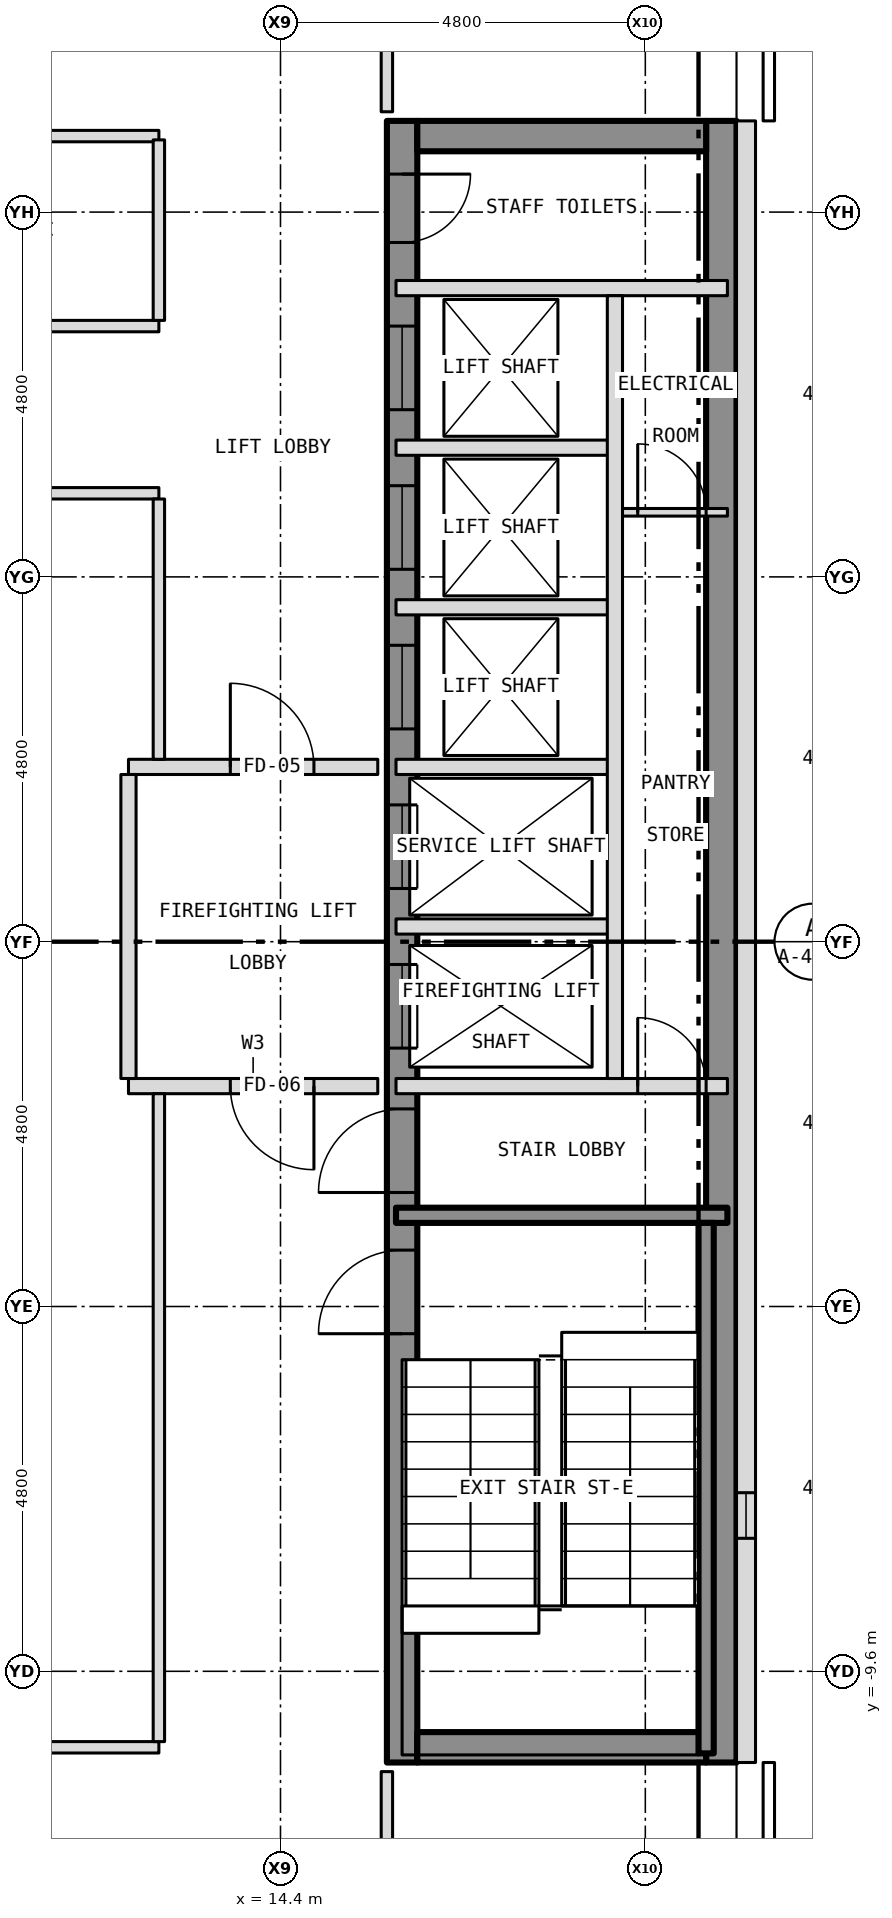
"""IFC4 building model, lengths in metres.
Left out: names, types, materials, properties, quantities, classifications, styles, units other than length and angle.
Written with IfcOpenShell. Run it as: python <this file> out.ifc"""

import sys

from ifc_helpers import new_model, si_unit, direction, frame, frame_2d, origin, place, context, subcontext, project, spatial, rectangle, extrude, element, fill, save


model = new_model("IFC4")
c1 = context("Model", 3, precision=1e-05, world=origin(), true_north=direction((0.0, 1.0)))
c2 = subcontext(c1, "Body", "Model", "MODEL_VIEW")
j1 = project(units=[si_unit("LENGTHUNIT", "METRE"), si_unit("PLANEANGLEUNIT", "RADIAN")], contexts=[c1])
p1 = place(None, origin())
s1 = spatial("IfcSite", under=j1, at=p1, CompositionType="ELEMENT")
p2 = place(p1, origin())
s2 = spatial("IfcBuilding", under=s1, at=p2, CompositionType="ELEMENT")
p3 = place(p2, frame((0.0, 0.0, 215.5)))
s3 = spatial("IfcBuildingStorey", under=s2, at=p3, CompositionType="ELEMENT", Elevation=215.5)
p4 = place(p3, frame((16.0, -10.8, 0.0), z_axis=(0.0, 0.0, 1.0), x_axis=(0.0, 1.0, 0.0)))
e1 = element("IfcWall", 1, at=p4, inside=s3, PredefinedType="SHEAR", context=c2, shape_type="SweptSolid", body=[
    extrude(rectangle(XDim=21.6, YDim=0.4, at=frame_2d((10.8, 0.0))), origin(), (0.0, 0.0, 1.0), 3.25),
])
p5 = place(p4, frame((9.4, 0.0, 0.0)))
e2 = element("IfcOpeningElement", 2, at=p5, cuts=e1, PredefinedType="OPENING", context=c2, shape_type="SweptSolid", body=[
    extrude(rectangle(XDim=1.1, YDim=2.1, at=frame_2d((0.55, 1.05))), frame((0.0, 0.212, 0.0), z_axis=(0.0, -1.0, 0.0), x_axis=(1.0, 0.0, 0.0)), (0.0, 0.0, 1.0), 0.424),
])
p6 = place(p4, frame((11.5, 0.0, 0.0)))
e3 = element("IfcOpeningElement", 3, at=p6, cuts=e1, PredefinedType="OPENING", context=c2, shape_type="SweptSolid", body=[
    extrude(rectangle(XDim=1.1, YDim=2.1, at=frame_2d((0.55, 1.05))), frame((0.0, 0.212, 0.0), z_axis=(0.0, -1.0, 0.0), x_axis=(1.0, 0.0, 0.0)), (0.0, 0.0, 1.0), 0.424),
])
p7 = place(p4, frame((13.6, 0.0, 0.0)))
e4 = element("IfcOpeningElement", 4, at=p7, cuts=e1, PredefinedType="OPENING", context=c2, shape_type="SweptSolid", body=[
    extrude(rectangle(XDim=1.1, YDim=2.1, at=frame_2d((0.55, 1.05))), frame((0.0, 0.212, 0.0), z_axis=(0.0, -1.0, 0.0), x_axis=(1.0, 0.0, 0.0)), (0.0, 0.0, 1.0), 0.424),
])
p8 = place(p4, frame((15.7, 0.0, 0.0)))
e5 = element("IfcOpeningElement", 5, at=p8, cuts=e1, PredefinedType="OPENING", context=c2, shape_type="SweptSolid", body=[
    extrude(rectangle(XDim=1.1, YDim=2.1, at=frame_2d((0.55, 1.05))), frame((0.0, 0.212, 0.0), z_axis=(0.0, -1.0, 0.0), x_axis=(1.0, 0.0, 0.0)), (0.0, 0.0, 1.0), 0.424),
])
p9 = place(p4, frame((17.8, 0.0, 0.0)))
e6 = element("IfcOpeningElement", 6, at=p9, cuts=e1, PredefinedType="OPENING", context=c2, shape_type="SweptSolid", body=[
    extrude(rectangle(XDim=1.1, YDim=2.1, at=frame_2d((0.55, 1.05))), frame((0.0, 0.212, 0.0), z_axis=(0.0, -1.0, 0.0), x_axis=(1.0, 0.0, 0.0)), (0.0, 0.0, 1.0), 0.424),
])
p10 = place(p4, frame((5.642, 0.0, 0.0)))
e7 = element("IfcOpeningElement", 7, at=p10, cuts=e1, PredefinedType="OPENING", context=c2, shape_type="SweptSolid", body=[
    extrude(rectangle(XDim=1.1, YDim=2.1, at=frame_2d((0.55, 1.05))), frame((0.0, 0.212, 0.0), z_axis=(0.0, -1.0, 0.0), x_axis=(1.0, 0.0, 0.0)), (0.0, 0.0, 1.0), 0.424),
])
p11 = place(p4, frame((7.5, 0.0, 0.0)))
e8 = element("IfcOpeningElement", 8, at=p11, cuts=e1, PredefinedType="OPENING", context=c2, shape_type="SweptSolid", body=[
    extrude(rectangle(XDim=1.1, YDim=2.1, at=frame_2d((0.55, 1.05))), frame((0.0, 0.212, 0.0), z_axis=(0.0, -1.0, 0.0), x_axis=(1.0, 0.0, 0.0)), (0.0, 0.0, 1.0), 0.424),
])
p12 = place(p4, frame((20.0, 0.0, 0.0)))
e9 = element("IfcOpeningElement", 9, at=p12, cuts=e1, PredefinedType="OPENING", context=c2, shape_type="SweptSolid", body=[
    extrude(rectangle(XDim=0.9, YDim=2.1, at=frame_2d((0.45, 1.05))), frame((0.0, 0.212, 0.0), z_axis=(0.0, -1.0, 0.0), x_axis=(1.0, 0.0, 0.0)), (0.0, 0.0, 1.0), 0.424),
])
p13 = place(p3, frame((20.2, -10.8, 0.0), z_axis=(0.0, 0.0, 1.0), x_axis=(0.0, 1.0, 0.0)))
e10 = element("IfcWall", 10, at=p13, inside=s3, PredefinedType="SHEAR", context=c2, shape_type="SweptSolid", body=[
    extrude(rectangle(XDim=21.6, YDim=0.4, at=frame_2d((10.8, 0.0))), origin(), (0.0, 0.0, 1.0), 3.25),
])
for number, where, z_axis, x_axis in (
    (11, (16.2, 10.6, 0.0), (0.0, 0.0, 1.0), (1.0, 0.0, 0.0)),
    (12, (16.2, -10.6, 0.0), (0.0, 0.0, 1.0), (1.0, 0.0, 0.0)),
):
    element("IfcWall", number, at=place(p3, frame(where, z_axis=z_axis, x_axis=x_axis)), inside=s3, PredefinedType="SHEAR", context=c2, shape_type="SweptSolid", body=[
        extrude(rectangle(XDim=3.8, YDim=0.4, at=frame_2d((1.9, 0.0))), origin(), (0.0, 0.0, 1.0), 3.25),
    ])
p14 = place(p3, frame((20.525, -10.8, 0.0), z_axis=(0.0, 0.0, 1.0), x_axis=(0.0, 1.0, 0.0)))
e13 = element("IfcWall", 13, at=p14, inside=s3, PredefinedType="SOLIDWALL", context=c2, shape_type="SweptSolid", body=[
    extrude(rectangle(XDim=21.6, YDim=0.25, at=frame_2d((10.8, 0.0))), origin(), (0.0, 0.0, 1.0), 3.5),
])
p15 = place(p14, frame((2.95, 0.0, 1.0)))
e14 = element("IfcOpeningElement", 14, at=p15, cuts=e13, PredefinedType="OPENING", context=c2, shape_type="SweptSolid", body=[
    extrude(rectangle(XDim=0.6, YDim=1.5, at=frame_2d((0.3, 0.75))), frame((0.0, 0.137, 0.0), z_axis=(0.0, -1.0, 0.0), x_axis=(1.0, 0.0, 0.0)), (0.0, 0.0, 1.0), 0.274),
])
p16 = place(p3, frame((3.3, -10.6, 0.0), z_axis=(0.0, 0.0, 1.0), x_axis=(1.0, 0.0, 0.0)))
e15 = element("IfcWall", 15, at=p16, inside=s3, PredefinedType="PARTITIONING", context=c2, shape_type="SweptSolid", body=[
    extrude(rectangle(XDim=9.5, YDim=0.15, at=frame_2d((4.75, 0.0))), origin(), (0.0, 0.0, 1.0), 3.35),
])
p17 = place(p3, frame((15.92, -3.6, 0.0), z_axis=(0.0, 0.0, 1.0), x_axis=(1.0, 0.0, 0.0)))
e16 = element("IfcWall", 16, at=p17, inside=s3, PredefinedType="SHEAR", context=c2, shape_type="SweptSolid", body=[
    extrude(rectangle(XDim=4.36, YDim=0.2, at=frame_2d((2.18, 0.0))), origin(), (0.0, 0.0, 1.0), 3.25),
])
p18 = place(p3, frame((12.4, -1.9, 0.0), z_axis=(0.0, 0.0, 1.0), x_axis=(1.0, 0.0, 0.0)))
e17 = element("IfcWall", 17, at=p18, inside=s3, PredefinedType="PARTITIONING", context=c2, shape_type="SweptSolid", body=[
    extrude(rectangle(XDim=3.28, YDim=0.2, at=frame_2d((1.64, 0.0))), origin(), (0.0, 0.0, 1.0), 3.35),
])
p19 = place(p18, frame((1.34, 0.0, 0.0)))
e18 = element("IfcOpeningElement", 18, at=p19, cuts=e17, PredefinedType="OPENING", context=c2, shape_type="SweptSolid", body=[
    extrude(rectangle(XDim=1.1, YDim=2.1, at=frame_2d((0.55, 1.05))), frame((0.0, 0.112, 0.0), z_axis=(0.0, -1.0, 0.0), x_axis=(1.0, 0.0, 0.0)), (0.0, 0.0, 1.0), 0.224),
])
p20 = place(p3, frame((15.92, -1.9, 0.0), z_axis=(0.0, 0.0, 1.0), x_axis=(1.0, 0.0, 0.0)))
e19 = element("IfcWall", 19, at=p20, inside=s3, PredefinedType="PARTITIONING", context=c2, shape_type="SweptSolid", body=[
    extrude(rectangle(XDim=4.36, YDim=0.2, at=frame_2d((2.18, 0.0))), origin(), (0.0, 0.0, 1.0), 3.25),
])
p21 = place(p20, frame((3.18, 0.0, 0.0)))
e20 = element("IfcOpeningElement", 20, at=p21, cuts=e19, PredefinedType="OPENING", context=c2, shape_type="SweptSolid", body=[
    extrude(rectangle(XDim=0.9, YDim=2.1, at=frame_2d((0.45, 1.05))), frame((0.0, 0.112, 0.0), z_axis=(0.0, -1.0, 0.0), x_axis=(1.0, 0.0, 0.0)), (0.0, 0.0, 1.0), 0.224),
])
p22 = place(p3, frame((15.92, 0.2, 0.0), z_axis=(0.0, 0.0, 1.0), x_axis=(1.0, 0.0, 0.0)))
e21 = element("IfcWall", 21, at=p22, inside=s3, PredefinedType="PARTITIONING", context=c2, shape_type="SweptSolid", body=[
    extrude(rectangle(XDim=2.88, YDim=0.2, at=frame_2d((1.44, 0.0))), origin(), (0.0, 0.0, 1.0), 3.25),
])
p23 = place(p3, frame((12.4, 2.3, 0.0), z_axis=(0.0, 0.0, 1.0), x_axis=(1.0, 0.0, 0.0)))
e22 = element("IfcWall", 22, at=p23, inside=s3, PredefinedType="PARTITIONING", context=c2, shape_type="SweptSolid", body=[
    extrude(rectangle(XDim=3.28, YDim=0.2, at=frame_2d((1.64, 0.0))), origin(), (0.0, 0.0, 1.0), 3.35),
])
p24 = place(p23, frame((1.34, 0.0, 0.0)))
e23 = element("IfcOpeningElement", 23, at=p24, cuts=e22, PredefinedType="OPENING", context=c2, shape_type="SweptSolid", body=[
    extrude(rectangle(XDim=1.1, YDim=2.1, at=frame_2d((0.55, 1.05))), frame((0.0, 0.112, 0.0), z_axis=(0.0, -1.0, 0.0), x_axis=(1.0, 0.0, 0.0)), (0.0, 0.0, 1.0), 0.224),
])
for number, where, z_axis, x_axis in (
    (24, (15.92, 2.3, 0.0), (0.0, 0.0, 1.0), (1.0, 0.0, 0.0)),
    (25, (15.92, 4.4, 0.0), (0.0, 0.0, 1.0), (1.0, 0.0, 0.0)),
):
    element("IfcWall", number, at=place(p3, frame(where, z_axis=z_axis, x_axis=x_axis)), inside=s3, PredefinedType="PARTITIONING", context=c2, shape_type="SweptSolid", body=[
        extrude(rectangle(XDim=2.88, YDim=0.2, at=frame_2d((1.44, 0.0))), origin(), (0.0, 0.0, 1.0), 3.25),
    ])
p25 = place(p3, frame((18.8, 5.65, 0.0), z_axis=(0.0, 0.0, 1.0), x_axis=(1.0, 0.0, 0.0)))
e26 = element("IfcWall", 26, at=p25, inside=s3, PredefinedType="PARTITIONING", context=c2, shape_type="SweptSolid", body=[
    extrude(rectangle(XDim=1.48, YDim=0.1, at=frame_2d((0.74, 0.0))), origin(), (0.0, 0.0, 1.0), 3.25),
])
p26 = place(p25, frame((0.3, 0.0, 0.0)))
e27 = element("IfcOpeningElement", 27, at=p26, cuts=e26, PredefinedType="OPENING", context=c2, shape_type="SweptSolid", body=[
    extrude(rectangle(XDim=0.9, YDim=2.1, at=frame_2d((0.45, 1.05))), frame((0.0, 0.062, 0.0), z_axis=(0.0, -1.0, 0.0), x_axis=(1.0, 0.0, 0.0)), (0.0, 0.0, 1.0), 0.124),
])
p27 = place(p3, frame((3.3, 5.9, 0.0), z_axis=(0.0, 0.0, 1.0), x_axis=(1.0, 0.0, 0.0)))
e28 = element("IfcWall", 28, at=p27, inside=s3, PredefinedType="PARTITIONING", context=c2, shape_type="SweptSolid", body=[
    extrude(rectangle(XDim=9.5, YDim=0.15, at=frame_2d((4.75, 0.0))), origin(), (0.0, 0.0, 1.0), 3.35),
])
p28 = place(p3, frame((15.92, 6.5, 0.0), z_axis=(0.0, 0.0, 1.0), x_axis=(1.0, 0.0, 0.0)))
e29 = element("IfcWall", 29, at=p28, inside=s3, PredefinedType="PARTITIONING", context=c2, shape_type="SweptSolid", body=[
    extrude(rectangle(XDim=2.88, YDim=0.2, at=frame_2d((1.44, 0.0))), origin(), (0.0, 0.0, 1.0), 3.25),
])
p29 = place(p3, frame((3.3, 8.1, 0.0), z_axis=(0.0, 0.0, 1.0), x_axis=(1.0, 0.0, 0.0)))
e30 = element("IfcWall", 30, at=p29, inside=s3, PredefinedType="PARTITIONING", context=c2, shape_type="SweptSolid", body=[
    extrude(rectangle(XDim=9.5, YDim=0.15, at=frame_2d((4.75, 0.0))), origin(), (0.0, 0.0, 1.0), 3.35),
])
p30 = place(p29, frame((6.675, 0.0, 0.0)))
e31 = element("IfcOpeningElement", 31, at=p30, cuts=e30, PredefinedType="OPENING", context=c2, shape_type="SweptSolid", body=[
    extrude(rectangle(XDim=0.9, YDim=2.1, at=frame_2d((0.45, 1.05))), frame((0.0, 0.087, 0.0), z_axis=(0.0, -1.0, 0.0), x_axis=(1.0, 0.0, 0.0)), (0.0, 0.0, 1.0), 0.174),
])
p31 = place(p3, frame((15.92, 8.6, 0.0), z_axis=(0.0, 0.0, 1.0), x_axis=(1.0, 0.0, 0.0)))
e32 = element("IfcWall", 32, at=p31, inside=s3, PredefinedType="PARTITIONING", context=c2, shape_type="SweptSolid", body=[
    extrude(rectangle(XDim=4.36, YDim=0.2, at=frame_2d((2.18, 0.0))), origin(), (0.0, 0.0, 1.0), 3.25),
])
p32 = place(p3, frame((3.3, 10.6, 0.0), z_axis=(0.0, 0.0, 1.0), x_axis=(1.0, 0.0, 0.0)))
e33 = element("IfcWall", 33, at=p32, inside=s3, PredefinedType="PARTITIONING", context=c2, shape_type="SweptSolid", body=[
    extrude(rectangle(XDim=9.5, YDim=0.15, at=frame_2d((4.75, 0.0))), origin(), (0.0, 0.0, 1.0), 3.35),
])
p33 = place(p32, frame((1.925, 0.0, 0.0)))
e34 = element("IfcOpeningElement", 34, at=p33, cuts=e33, PredefinedType="OPENING", context=c2, shape_type="SweptSolid", body=[
    extrude(rectangle(XDim=0.9, YDim=2.1, at=frame_2d((0.45, 1.05))), frame((0.0, 0.087, 0.0), z_axis=(0.0, -1.0, 0.0), x_axis=(1.0, 0.0, 0.0)), (0.0, 0.0, 1.0), 0.174),
])
p34 = place(p3, frame((12.4, -1.8, 0.0), z_axis=(0.0, 0.0, 1.0), x_axis=(0.0, 1.0, 0.0)))
e35 = element("IfcWall", 35, at=p34, inside=s3, PredefinedType="PARTITIONING", context=c2, shape_type="SweptSolid", body=[
    extrude(rectangle(XDim=4.0, YDim=0.2, at=frame_2d((2.0, 0.0))), origin(), (0.0, 0.0, 1.0), 3.35),
])
p35 = place(p3, frame((12.8, -10.525, 0.0), z_axis=(0.0, 0.0, 1.0), x_axis=(0.0, 1.0, 0.0)))
e36 = element("IfcWall", 36, at=p35, inside=s3, PredefinedType="PARTITIONING", context=c2, shape_type="SweptSolid", body=[
    extrude(rectangle(XDim=8.525, YDim=0.15, at=frame_2d((4.262, 0.0))), origin(), (0.0, 0.0, 1.0), 3.35),
])
p36 = place(p3, frame((12.8, 2.4, 0.0), z_axis=(0.0, 0.0, 1.0), x_axis=(0.0, 1.0, 0.0)))
e37 = element("IfcWall", 37, at=p36, inside=s3, PredefinedType="PARTITIONING", context=c2, shape_type="SweptSolid", body=[
    extrude(rectangle(XDim=3.425, YDim=0.15, at=frame_2d((1.712, 0.0))), origin(), (0.0, 0.0, 1.0), 3.35),
])
p37 = place(p3, frame((12.8, 8.175, 0.0), z_axis=(0.0, 0.0, 1.0), x_axis=(0.0, 1.0, 0.0)))
e38 = element("IfcWall", 38, at=p37, inside=s3, PredefinedType="PARTITIONING", context=c2, shape_type="SweptSolid", body=[
    extrude(rectangle(XDim=2.375, YDim=0.15, at=frame_2d((1.188, 0.0))), origin(), (0.0, 0.0, 1.0), 3.35),
])
for number, where, z_axis, x_axis in (
    (39, (15.8, -12.725, 0.0), (0.0, 0.0, 1.0), (0.0, 1.0, 0.0)),
    (40, (15.8, 10.92, 0.0), (0.0, 0.0, 1.0), (0.0, 1.0, 0.0)),
):
    element("IfcWall", number, at=place(p3, frame(where, z_axis=z_axis, x_axis=x_axis)), inside=s3, PredefinedType="PARTITIONING", context=c2, shape_type="SweptSolid", body=[
        extrude(rectangle(XDim=1.805, YDim=0.15, at=frame_2d((0.903, 0.0))), origin(), (0.0, 0.0, 1.0), 3.35),
    ])
p38 = place(p3, frame((18.8, -1.8, 0.0), z_axis=(0.0, 0.0, 1.0), x_axis=(0.0, 1.0, 0.0)))
e41 = element("IfcWall", 41, at=p38, inside=s3, PredefinedType="PARTITIONING", context=c2, shape_type="SweptSolid", body=[
    extrude(rectangle(XDim=10.3, YDim=0.2, at=frame_2d((5.15, 0.0))), origin(), (0.0, 0.0, 1.0), 3.25),
])
p39 = place(p3, frame((20.0, -10.68, 0.0), z_axis=(0.0, 0.0, 1.0), x_axis=(0.0, 1.0, 0.0)))
e42 = element("IfcWall", 42, at=p39, inside=s3, PredefinedType="SHEAR", context=c2, shape_type="SweptSolid", body=[
    extrude(rectangle(XDim=6.98, YDim=0.2, at=frame_2d((3.49, 0.0))), origin(), (0.0, 0.0, 1.0), 3.25),
])
p40 = place(p15, origin())
e43 = element("IfcWindow", 43, at=p40, inside=s3, PartitioningType="SINGLE_PANEL", PredefinedType="WINDOW", context=c2, shape_type="SweptSolid", body=[
    extrude(rectangle(XDim=0.6, YDim=1.5, at=frame_2d((0.3, 0.75))), frame((0.0, -0.035, 0.0), z_axis=(0.0, -1.0, 0.0), x_axis=(1.0, 0.0, 0.0)), (0.0, 0.0, 1.0), 0.06),
])
fill(e14, e43)
p41 = place(p5, origin())
e44 = element("IfcDoor", 44, at=p41, inside=s3, OperationType="SLIDING_TO_LEFT", PredefinedType="DOOR", context=c2, shape_type="SweptSolid", body=[
    extrude(rectangle(XDim=1.1, YDim=2.1, at=frame_2d((0.55, 1.05))), frame((0.0, 0.025, 0.0), z_axis=(0.0, -1.0, 0.0), x_axis=(1.0, 0.0, 0.0)), (0.0, 0.0, 1.0), 0.05),
])
fill(e2, e44)
p42 = place(p6, origin())
e45 = element("IfcDoor", 45, at=p42, inside=s3, OperationType="SLIDING_TO_LEFT", PredefinedType="DOOR", context=c2, shape_type="SweptSolid", body=[
    extrude(rectangle(XDim=1.1, YDim=2.1, at=frame_2d((0.55, 1.05))), frame((0.0, 0.025, 0.0), z_axis=(0.0, -1.0, 0.0), x_axis=(1.0, 0.0, 0.0)), (0.0, 0.0, 1.0), 0.05),
])
fill(e3, e45)
p43 = place(p7, origin())
e46 = element("IfcDoor", 46, at=p43, inside=s3, OperationType="SLIDING_TO_LEFT", PredefinedType="DOOR", context=c2, shape_type="SweptSolid", body=[
    extrude(rectangle(XDim=1.1, YDim=2.1, at=frame_2d((0.55, 1.05))), frame((0.0, 0.025, 0.0), z_axis=(0.0, -1.0, 0.0), x_axis=(1.0, 0.0, 0.0)), (0.0, 0.0, 1.0), 0.05),
])
fill(e4, e46)
p44 = place(p8, origin())
e47 = element("IfcDoor", 47, at=p44, inside=s3, OperationType="SLIDING_TO_LEFT", PredefinedType="DOOR", context=c2, shape_type="SweptSolid", body=[
    extrude(rectangle(XDim=1.1, YDim=2.1, at=frame_2d((0.55, 1.05))), frame((0.0, 0.025, 0.0), z_axis=(0.0, -1.0, 0.0), x_axis=(1.0, 0.0, 0.0)), (0.0, 0.0, 1.0), 0.05),
])
fill(e5, e47)
p45 = place(p9, origin())
e48 = element("IfcDoor", 48, at=p45, inside=s3, OperationType="SLIDING_TO_LEFT", PredefinedType="DOOR", context=c2, shape_type="SweptSolid", body=[
    extrude(rectangle(XDim=1.1, YDim=2.1, at=frame_2d((0.55, 1.05))), frame((0.0, 0.025, 0.0), z_axis=(0.0, -1.0, 0.0), x_axis=(1.0, 0.0, 0.0)), (0.0, 0.0, 1.0), 0.05),
])
fill(e6, e48)
p46 = place(p10, origin())
e49 = element("IfcDoor", 49, at=p46, inside=s3, OperationType="SINGLE_SWING_LEFT", PredefinedType="DOOR", context=c2, shape_type="SweptSolid", body=[
    extrude(rectangle(XDim=1.1, YDim=2.1, at=frame_2d((0.55, 1.05))), frame((0.0, 0.025, 0.0), z_axis=(0.0, -1.0, 0.0), x_axis=(1.0, 0.0, 0.0)), (0.0, 0.0, 1.0), 0.05),
])
fill(e7, e49)
p47 = place(p11, origin())
e50 = element("IfcDoor", 50, at=p47, inside=s3, OperationType="SINGLE_SWING_LEFT", PredefinedType="DOOR", context=c2, shape_type="SweptSolid", body=[
    extrude(rectangle(XDim=1.1, YDim=2.1, at=frame_2d((0.55, 1.05))), frame((0.0, 0.025, 0.0), z_axis=(0.0, -1.0, 0.0), x_axis=(1.0, 0.0, 0.0)), (0.0, 0.0, 1.0), 0.05),
])
fill(e8, e50)
p48 = place(p12, origin())
e51 = element("IfcDoor", 51, at=p48, inside=s3, OperationType="SINGLE_SWING_RIGHT", PredefinedType="DOOR", context=c2, shape_type="SweptSolid", body=[
    extrude(rectangle(XDim=0.9, YDim=2.1, at=frame_2d((0.45, 1.05))), frame((0.0, 0.025, 0.0), z_axis=(0.0, -1.0, 0.0), x_axis=(1.0, 0.0, 0.0)), (0.0, 0.0, 1.0), 0.05),
])
fill(e9, e51)
p49 = place(p21, origin())
e52 = element("IfcDoor", 52, at=p49, inside=s3, OperationType="SINGLE_SWING_LEFT", PredefinedType="DOOR", context=c2, shape_type="SweptSolid", body=[
    extrude(rectangle(XDim=0.9, YDim=2.1, at=frame_2d((0.45, 1.05))), frame((0.0, 0.025, 0.0), z_axis=(0.0, -1.0, 0.0), x_axis=(1.0, 0.0, 0.0)), (0.0, 0.0, 1.0), 0.05),
])
fill(e20, e52)
p50 = place(p26, origin())
e53 = element("IfcDoor", 53, at=p50, inside=s3, OperationType="SINGLE_SWING_LEFT", PredefinedType="DOOR", context=c2, shape_type="SweptSolid", body=[
    extrude(rectangle(XDim=0.9, YDim=2.1, at=frame_2d((0.45, 1.05))), frame((0.0, 0.025, 0.0), z_axis=(0.0, -1.0, 0.0), x_axis=(1.0, 0.0, 0.0)), (0.0, 0.0, 1.0), 0.05),
])
fill(e27, e53)
p51 = place(p24, origin())
e54 = element("IfcDoor", 54, at=p51, inside=s3, OperationType="SINGLE_SWING_LEFT", PredefinedType="DOOR", context=c2, shape_type="SweptSolid", body=[
    extrude(rectangle(XDim=1.1, YDim=2.1, at=frame_2d((0.55, 1.05))), frame((0.0, 0.025, 0.0), z_axis=(0.0, -1.0, 0.0), x_axis=(1.0, 0.0, 0.0)), (0.0, 0.0, 1.0), 0.05),
])
fill(e23, e54)
p52 = place(p19, origin())
e55 = element("IfcDoor", 55, at=p52, inside=s3, OperationType="SINGLE_SWING_RIGHT", PredefinedType="DOOR", context=c2, shape_type="SweptSolid", body=[
    extrude(rectangle(XDim=1.1, YDim=2.1, at=frame_2d((0.55, 1.05))), frame((0.0, 0.025, 0.0), z_axis=(0.0, -1.0, 0.0), x_axis=(1.0, 0.0, 0.0)), (0.0, 0.0, 1.0), 0.05),
])
fill(e18, e55)
save(model, sys.argv[1])
